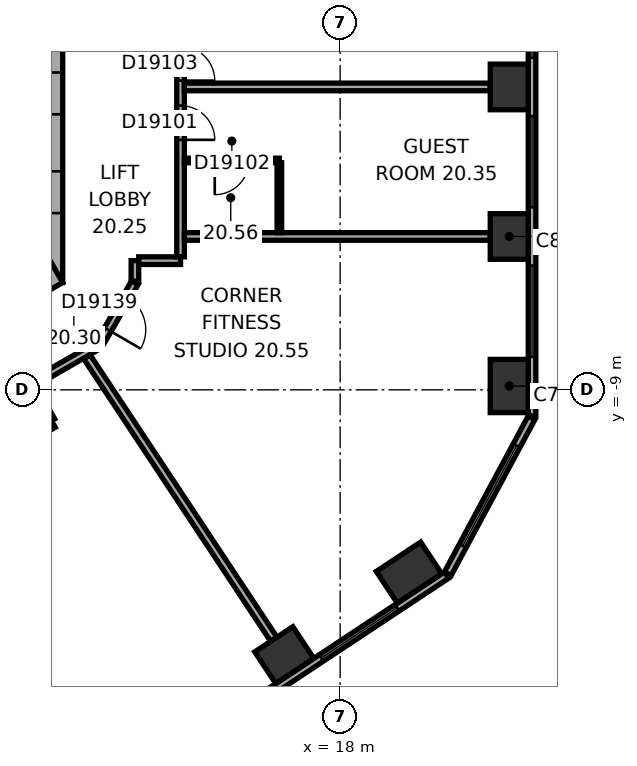
"""IFC4 building model, lengths in metres.
Left out: names, types, materials, properties, quantities, classifications, styles, units other than length and angle.
Written with IfcOpenShell. Run it as: python <this file> out.ifc"""

import sys

from ifc_helpers import new_model, si_unit, direction, frame, frame_2d, origin, origin_2d, place, context, subcontext, project, spatial, rectangle, extrude, element, fill, save


model = new_model("IFC4")
c1 = context("Model", 3, precision=1e-05, world=origin(), true_north=direction((0.0, 1.0)))
c2 = subcontext(c1, "Body", "Model", "MODEL_VIEW")
j1 = project(units=[si_unit("LENGTHUNIT", "METRE"), si_unit("PLANEANGLEUNIT", "RADIAN")], contexts=[c1])
p1 = place(None, origin())
s1 = spatial("IfcSite", under=j1, at=p1, CompositionType="ELEMENT")
p2 = place(p1, origin())
s2 = spatial("IfcBuilding", under=s1, at=p2, CompositionType="ELEMENT")
p3 = place(p2, frame((0.0, 0.0, 90.2)))
s3 = spatial("IfcBuildingStorey", under=s2, at=p3, CompositionType="ELEMENT", Elevation=90.2)
p4 = place(p3, frame((22.45, -8.899, 0.0), z_axis=(0.0, 0.0, 1.0), x_axis=(0.0, 1.0, 0.0)))
e1 = element("IfcColumn", 1, at=p4, inside=s3, PredefinedType="COLUMN", context=c2, shape_type="SweptSolid", body=[
    extrude(rectangle(XDim=1.4, YDim=1.0, at=origin_2d()), origin(), (0.0, 0.0, 1.0), 3.3),
])
for number, where, z_axis, x_axis in (
    (2, (22.45, -4.965, 0.0), (0.0, 0.0, 1.0), (0.0, 1.0, 0.0)),
    (3, (22.45, -1.03, 0.0), (0.0, 0.0, 1.0), (0.0, 1.0, 0.0)),
    (4, (16.531, -15.981, 0.0), (0.0, 0.0, 1.0), (0.834, 0.552, 0.0)),
):
    element("IfcColumn", number, at=place(p3, frame(where, z_axis=z_axis, x_axis=x_axis)), inside=s3, PredefinedType="COLUMN", context=c2, shape_type="SweptSolid", body=[
        extrude(rectangle(XDim=1.2, YDim=1.0, at=origin_2d()), origin(), (0.0, 0.0, 1.0), 3.3),
    ])
p5 = place(p3, frame((19.812, -13.809, 0.0), z_axis=(0.0, 0.0, 1.0), x_axis=(0.833885822067, 0.551936985312, 0.0)))
e5 = element("IfcColumn", 5, at=p5, inside=s3, PredefinedType="COLUMN", context=c2, shape_type="SweptSolid", body=[
    extrude(rectangle(XDim=1.4, YDim=1.0, at=origin_2d()), origin(), (0.0, 0.0, 1.0), 3.3),
])
p6 = place(p3, frame((10.1, -6.177, 0.0), z_axis=(0.0, 0.0, 1.0), x_axis=(0.0, 1.0, 0.0)))
e6 = element("IfcWall", 6, at=p6, inside=s3, PredefinedType="SHEAR", context=c2, shape_type="SweptSolid", body=[
    extrude(rectangle(XDim=12.355, YDim=1.2, at=frame_2d((6.177, 0.0))), origin(), (0.0, 0.0, 1.0), 3.3),
])
p7 = place(p6, frame((6.378, 0.0, 0.0)))
e7 = element("IfcOpeningElement", 7, at=p7, cuts=e6, PredefinedType="OPENING", context=c2, shape_type="SweptSolid", body=[
    extrude(rectangle(XDim=1.5, YDim=2.1, at=frame_2d((0.75, 1.05))), frame((0.0, 0.61, 0.0), z_axis=(0.0, -1.0, 0.0), x_axis=(1.0, 0.0, 0.0)), (0.0, 0.0, 1.0), 1.22),
])
p8 = place(p6, frame((1.828, 0.0, 0.0)))
e8 = element("IfcOpeningElement", 8, at=p8, cuts=e6, PredefinedType="OPENING", context=c2, shape_type="SweptSolid", body=[
    extrude(rectangle(XDim=1.1, YDim=2.1, at=frame_2d((0.55, 1.05))), frame((0.0, 0.61, 0.0), z_axis=(0.0, -1.0, 0.0), x_axis=(1.0, 0.0, 0.0)), (0.0, 0.0, 1.0), 1.22),
])
p9 = place(p6, frame((4.427, 0.0, 0.0)))
e9 = element("IfcOpeningElement", 9, at=p9, cuts=e6, PredefinedType="OPENING", context=c2, shape_type="SweptSolid", body=[
    extrude(rectangle(XDim=1.1, YDim=2.1, at=frame_2d((0.55, 1.05))), frame((0.0, 0.61, 0.0), z_axis=(0.0, -1.0, 0.0), x_axis=(1.0, 0.0, 0.0)), (0.0, 0.0, 1.0), 1.22),
])
p10 = place(p3, frame((-0.3, -11.836, 0.0), z_axis=(0.0, 0.0, 1.0), x_axis=(0.866021384402, 0.500006961711, 0.0)))
e10 = element("IfcWall", 10, at=p10, inside=s3, PredefinedType="SHEAR", context=c2, shape_type="SweptSolid", body=[
    extrude(rectangle(XDim=12.355, YDim=1.2, at=frame_2d((6.178, 0.0))), origin(), (0.0, 0.0, 1.0), 3.3),
])
p11 = place(p10, frame((4.128, 0.0, 0.0)))
e11 = element("IfcOpeningElement", 11, at=p11, cuts=e10, PredefinedType="OPENING", context=c2, shape_type="SweptSolid", body=[
    extrude(rectangle(XDim=0.9, YDim=2.1, at=frame_2d((0.45, 1.05))), frame((0.0, 0.61, 0.0), z_axis=(0.0, -1.0, 0.0), x_axis=(1.0, 0.0, 0.0)), (0.0, 0.0, 1.0), 1.22),
])
p12 = place(p10, frame((7.928, 0.0, 0.0)))
e12 = element("IfcOpeningElement", 12, at=p12, cuts=e10, PredefinedType="OPENING", context=c2, shape_type="SweptSolid", body=[
    extrude(rectangle(XDim=1.1, YDim=2.1, at=frame_2d((0.55, 1.05))), frame((0.0, 0.61, 0.0), z_axis=(0.0, -1.0, 0.0), x_axis=(1.0, 0.0, 0.0)), (0.0, 0.0, 1.0), 1.22),
])
p13 = place(p3, frame((23.05, -9.687, 0.0), z_axis=(0.0, 0.0, 1.0), x_axis=(0.0, 1.0, 0.0)))
e13 = element("IfcWall", 13, at=p13, inside=s3, PredefinedType="STANDARD", context=c2, shape_type="SweptSolid", body=[
    extrude(rectangle(XDim=21.246, YDim=0.2, at=frame_2d((10.623, 0.0))), origin(), (0.0, 0.0, 1.0), 3.3),
])
p14 = place(p13, frame((1.555, 0.0, 0.8)))
e14 = element("IfcOpeningElement", 14, at=p14, cuts=e13, PredefinedType="OPENING", context=c2, shape_type="SweptSolid", body=[
    extrude(rectangle(XDim=2.4, YDim=1.7, at=frame_2d((1.2, 0.85))), frame((0.0, 0.11, 0.0), z_axis=(0.0, -1.0, 0.0), x_axis=(1.0, 0.0, 0.0)), (0.0, 0.0, 1.0), 0.22),
])
p15 = place(p13, frame((5.489, 0.0, 0.8)))
e15 = element("IfcOpeningElement", 15, at=p15, cuts=e13, PredefinedType="OPENING", context=c2, shape_type="SweptSolid", body=[
    extrude(rectangle(XDim=2.4, YDim=1.7, at=frame_2d((1.2, 0.85))), frame((0.0, 0.11, 0.0), z_axis=(0.0, -1.0, 0.0), x_axis=(1.0, 0.0, 0.0)), (0.0, 0.0, 1.0), 0.22),
])
p16 = place(p13, frame((9.424, 0.0, 0.8)))
e16 = element("IfcOpeningElement", 16, at=p16, cuts=e13, PredefinedType="OPENING", context=c2, shape_type="SweptSolid", body=[
    extrude(rectangle(XDim=2.4, YDim=1.7, at=frame_2d((1.2, 0.85))), frame((0.0, 0.11, 0.0), z_axis=(0.0, -1.0, 0.0), x_axis=(1.0, 0.0, 0.0)), (0.0, 0.0, 1.0), 0.22),
])
p17 = place(p13, frame((13.358, 0.0, 0.8)))
e17 = element("IfcOpeningElement", 17, at=p17, cuts=e13, PredefinedType="OPENING", context=c2, shape_type="SweptSolid", body=[
    extrude(rectangle(XDim=2.4, YDim=1.7, at=frame_2d((1.2, 0.85))), frame((0.0, 0.11, 0.0), z_axis=(0.0, -1.0, 0.0), x_axis=(1.0, 0.0, 0.0)), (0.0, 0.0, 1.0), 0.22),
])
p18 = place(p13, frame((17.293, 0.0, 0.8)))
e18 = element("IfcOpeningElement", 18, at=p18, cuts=e13, PredefinedType="OPENING", context=c2, shape_type="SweptSolid", body=[
    extrude(rectangle(XDim=2.4, YDim=1.7, at=frame_2d((1.2, 0.85))), frame((0.0, 0.11, 0.0), z_axis=(0.0, -1.0, 0.0), x_axis=(1.0, 0.0, 0.0)), (0.0, 0.0, 1.0), 0.22),
])
p19 = place(p3, frame((3.083, -25.601, 0.0), z_axis=(0.0, 0.0, 1.0), x_axis=(0.833884295743, 0.551939291329, 0.0)))
e19 = element("IfcWall", 19, at=p19, inside=s3, PredefinedType="STANDARD", context=c2, shape_type="SweptSolid", body=[
    extrude(rectangle(XDim=21.246, YDim=0.2, at=frame_2d((10.623, 0.0))), origin(), (0.0, 0.0, 1.0), 3.3),
])
p20 = place(p19, frame((1.553, 0.0, 0.8)))
e20 = element("IfcOpeningElement", 20, at=p20, cuts=e19, PredefinedType="OPENING", context=c2, shape_type="SweptSolid", body=[
    extrude(rectangle(XDim=2.4, YDim=1.7, at=frame_2d((1.2, 0.85))), frame((0.0, 0.11, 0.0), z_axis=(0.0, -1.0, 0.0), x_axis=(1.0, 0.0, 0.0)), (0.0, 0.0, 1.0), 0.22),
])
p21 = place(p19, frame((5.488, 0.0, 0.8)))
e21 = element("IfcOpeningElement", 21, at=p21, cuts=e19, PredefinedType="OPENING", context=c2, shape_type="SweptSolid", body=[
    extrude(rectangle(XDim=2.4, YDim=1.7, at=frame_2d((1.2, 0.85))), frame((0.0, 0.11, 0.0), z_axis=(0.0, -1.0, 0.0), x_axis=(1.0, 0.0, 0.0)), (0.0, 0.0, 1.0), 0.22),
])
p22 = place(p19, frame((9.422, 0.0, 0.8)))
e22 = element("IfcOpeningElement", 22, at=p22, cuts=e19, PredefinedType="OPENING", context=c2, shape_type="SweptSolid", body=[
    extrude(rectangle(XDim=2.4, YDim=1.7, at=frame_2d((1.2, 0.85))), frame((0.0, 0.11, 0.0), z_axis=(0.0, -1.0, 0.0), x_axis=(1.0, 0.0, 0.0)), (0.0, 0.0, 1.0), 0.22),
])
p23 = place(p19, frame((13.357, 0.0, 0.8)))
e23 = element("IfcOpeningElement", 23, at=p23, cuts=e19, PredefinedType="OPENING", context=c2, shape_type="SweptSolid", body=[
    extrude(rectangle(XDim=2.4, YDim=1.7, at=frame_2d((1.2, 0.85))), frame((0.0, 0.11, 0.0), z_axis=(0.0, -1.0, 0.0), x_axis=(1.0, 0.0, 0.0)), (0.0, 0.0, 1.0), 0.22),
])
p24 = place(p19, frame((17.291, 0.0, 0.8)))
e24 = element("IfcOpeningElement", 24, at=p24, cuts=e19, PredefinedType="OPENING", context=c2, shape_type="SweptSolid", body=[
    extrude(rectangle(XDim=2.4, YDim=1.7, at=frame_2d((1.2, 0.85))), frame((0.0, 0.11, 0.0), z_axis=(0.0, -1.0, 0.0), x_axis=(1.0, 0.0, 0.0)), (0.0, 0.0, 1.0), 0.22),
])
p25 = place(p3, frame((20.833, -13.839, 0.0), z_axis=(0.0, 0.0, 1.0), x_axis=(0.473321668581, 0.880889662813, 0.0)))
e25 = element("IfcWall", 25, at=p25, inside=s3, PredefinedType="STANDARD", context=c2, shape_type="SweptSolid", body=[
    extrude(rectangle(XDim=4.66, YDim=0.2, at=frame_2d((2.33, 0.0))), origin(), (0.0, 0.0, 1.0), 3.3),
])
p26 = place(p25, frame((0.83, 0.0, 0.8)))
e26 = element("IfcOpeningElement", 26, at=p26, cuts=e25, PredefinedType="OPENING", context=c2, shape_type="SweptSolid", body=[
    extrude(rectangle(XDim=3.0, YDim=1.7, at=frame_2d((1.5, 0.85))), frame((0.0, 0.11, 0.0), z_axis=(0.0, -1.0, 0.0), x_axis=(1.0, 0.0, 0.0)), (0.0, 0.0, 1.0), 0.22),
])
p27 = place(p3, frame((7.419, -11.653, 0.0), z_axis=(0.0, 0.0, 1.0), x_axis=(0.866038154057, 0.49997791523, 0.0)))
e27 = element("IfcWall", 27, at=p27, inside=s3, PredefinedType="PARTITIONING", context=c2, shape_type="SweptSolid", body=[
    extrude(rectangle(XDim=3.502, YDim=0.2, at=frame_2d((1.751, 0.0))), origin(), (0.0, 0.0, 1.0), 3.05),
])
p28 = place(p3, frame((9.852, -8.861, 0.0), z_axis=(0.0, 0.0, 1.0), x_axis=(0.866013291437, 0.500020978615, 0.0)))
e28 = element("IfcWall", 28, at=p28, inside=s3, PredefinedType="PARTITIONING", context=c2, shape_type="SweptSolid", body=[
    extrude(rectangle(XDim=2.077, YDim=0.2, at=frame_2d((1.038, 0.0))), origin(), (0.0, 0.0, 1.0), 3.05),
])
p29 = place(p3, frame((10.402, -9.815, 0.0), z_axis=(0.0, 0.0, 1.0), x_axis=(-0.499968756647, 0.866043441391, 0.0)))
e29 = element("IfcWall", 29, at=p29, inside=s3, PredefinedType="PARTITIONING", context=c2, shape_type="SweptSolid", body=[
    extrude(rectangle(XDim=1.001, YDim=0.2, at=frame_2d((0.5, 0.0))), origin(), (0.0, 0.0, 1.0), 3.05),
])
p30 = place(p3, frame((11.67, -7.788, 0.0), z_axis=(0.0, 0.0, 1.0), x_axis=(0.500063286585, 0.865988862174, 0.0)))
e30 = element("IfcWall", 30, at=p30, inside=s3, PredefinedType="PARTITIONING", context=c2, shape_type="SweptSolid", body=[
    extrude(rectangle(XDim=1.86, YDim=0.2, at=frame_2d((0.93, 0.0))), origin(), (0.0, 0.0, 1.0), 3.05),
])
p31 = place(p30, frame((0.43, 0.0, 0.0)))
e31 = element("IfcOpeningElement", 31, at=p31, cuts=e30, PredefinedType="OPENING", context=c2, shape_type="SweptSolid", body=[
    extrude(rectangle(XDim=1.0, YDim=2.1, at=frame_2d((0.5, 1.05))), frame((0.0, 0.11, 0.0), z_axis=(0.0, -1.0, 0.0), x_axis=(1.0, 0.0, 0.0)), (0.0, 0.0, 1.0), 0.22),
])
p32 = place(p3, frame((12.6, -6.138, 0.0), z_axis=(0.0, 0.0, 1.0), x_axis=(0.0, 1.0, 0.0)))
e32 = element("IfcWall", 32, at=p32, inside=s3, PredefinedType="PARTITIONING", context=c2, shape_type="SweptSolid", body=[
    extrude(rectangle(XDim=0.537, YDim=0.2, at=frame_2d((0.268, 0.0))), origin(), (0.0, 0.0, 1.0), 3.05),
])
p33 = place(p3, frame((12.7, -5.601, 0.0), z_axis=(0.0, 0.0, 1.0), x_axis=(1.0, 0.0, 0.0)))
e33 = element("IfcWall", 33, at=p33, inside=s3, PredefinedType="PARTITIONING", context=c2, shape_type="SweptSolid", body=[
    extrude(rectangle(XDim=1.101, YDim=0.2, at=frame_2d((0.551, 0.0))), origin(), (0.0, 0.0, 1.0), 3.05),
])
p34 = place(p3, frame((13.801, -5.501, 0.0), z_axis=(0.0, 0.0, 1.0), x_axis=(0.0, 1.0, 0.0)))
e34 = element("IfcWall", 34, at=p34, inside=s3, PredefinedType="PARTITIONING", context=c2, shape_type="SweptSolid", body=[
    extrude(rectangle(XDim=5.702, YDim=0.2, at=frame_2d((2.851, 0.0))), origin(), (0.0, 0.0, 1.0), 3.05),
])
p35 = place(p34, frame((3.079, 0.0, 0.0)))
e35 = element("IfcOpeningElement", 35, at=p35, cuts=e34, PredefinedType="OPENING", context=c2, shape_type="SweptSolid", body=[
    extrude(rectangle(XDim=0.9, YDim=2.1, at=frame_2d((0.45, 1.05))), frame((0.0, 0.11, 0.0), z_axis=(0.0, -1.0, 0.0), x_axis=(1.0, 0.0, 0.0)), (0.0, 0.0, 1.0), 0.22),
])
p36 = place(p34, frame((4.636, 0.0, 0.0)))
e36 = element("IfcOpeningElement", 36, at=p36, cuts=e34, PredefinedType="OPENING", context=c2, shape_type="SweptSolid", body=[
    extrude(rectangle(XDim=0.9, YDim=2.1, at=frame_2d((0.45, 1.05))), frame((0.0, 0.11, 0.0), z_axis=(0.0, -1.0, 0.0), x_axis=(1.0, 0.0, 0.0)), (0.0, 0.0, 1.0), 0.22),
])
p37 = place(p3, frame((13.901, -4.965, 0.0), z_axis=(0.0, 0.0, 1.0), x_axis=(1.0, 0.0, 0.0)))
e37 = element("IfcWall", 37, at=p37, inside=s3, PredefinedType="PARTITIONING", context=c2, shape_type="SweptSolid", body=[
    extrude(rectangle(XDim=8.049, YDim=0.2, at=frame_2d((4.024, 0.0))), origin(), (0.0, 0.0, 1.0), 3.05),
])
p38 = place(p3, frame((13.901, -2.965, 0.0), z_axis=(0.0, 0.0, 1.0), x_axis=(1.0, 0.0, 0.0)))
e38 = element("IfcWall", 38, at=p38, inside=s3, PredefinedType="PARTITIONING", context=c2, shape_type="SweptSolid", body=[
    extrude(rectangle(XDim=2.5, YDim=0.12, at=frame_2d((1.25, 0.0))), origin(), (0.0, 0.0, 1.0), 3.05),
])
p39 = place(p38, frame((0.8, 0.0, 0.0)))
e39 = element("IfcOpeningElement", 39, at=p39, cuts=e38, PredefinedType="OPENING", context=c2, shape_type="SweptSolid", body=[
    extrude(rectangle(XDim=0.9, YDim=2.1, at=frame_2d((0.45, 1.05))), frame((0.0, 0.07, 0.0), z_axis=(0.0, -1.0, 0.0), x_axis=(1.0, 0.0, 0.0)), (0.0, 0.0, 1.0), 0.14),
])
p40 = place(p3, frame((16.255, -15.564, 0.0), z_axis=(0.0, 0.0, 1.0), x_axis=(-0.55192208744, 0.833895682562, 0.0)))
e40 = element("IfcWall", 40, at=p40, inside=s3, PredefinedType="PARTITIONING", context=c2, shape_type="SweptSolid", body=[
    extrude(rectangle(XDim=8.913, YDim=0.2, at=frame_2d((4.457, 0.0))), origin(), (0.0, 0.0, 1.0), 2.6),
])
p41 = place(p3, frame((16.401, -3.025, 0.0), z_axis=(0.0, 0.0, 1.0), x_axis=(0.0, -1.0, 0.0)))
e41 = element("IfcWall", 41, at=p41, inside=s3, PredefinedType="PARTITIONING", context=c2, shape_type="SweptSolid", body=[
    extrude(rectangle(XDim=1.84, YDim=0.12, at=frame_2d((0.92, 0.0))), origin(), (0.0, 0.0, 1.0), 3.05),
])
p42 = place(p3, frame((21.95, -1.03, 0.0), z_axis=(0.0, 0.0, 1.0), x_axis=(-1.0, 0.0, 0.0)))
e42 = element("IfcWall", 42, at=p42, inside=s3, PredefinedType="PARTITIONING", context=c2, shape_type="SweptSolid", body=[
    extrude(rectangle(XDim=8.049, YDim=0.2, at=frame_2d((4.024, 0.0))), origin(), (0.0, 0.0, 1.0), 2.6),
])
p43 = place(p14, origin())
e43 = element("IfcWindow", 43, at=p43, inside=s3, PartitioningType="SINGLE_PANEL", PredefinedType="WINDOW", context=c2, shape_type="SweptSolid", body=[
    extrude(rectangle(XDim=2.4, YDim=1.7, at=frame_2d((1.2, 0.85))), frame((0.0, 0.03, 0.0), z_axis=(0.0, -1.0, 0.0), x_axis=(1.0, 0.0, 0.0)), (0.0, 0.0, 1.0), 0.06),
])
fill(e14, e43)
p44 = place(p15, origin())
e44 = element("IfcWindow", 44, at=p44, inside=s3, PartitioningType="SINGLE_PANEL", PredefinedType="WINDOW", context=c2, shape_type="SweptSolid", body=[
    extrude(rectangle(XDim=2.4, YDim=1.7, at=frame_2d((1.2, 0.85))), frame((0.0, 0.03, 0.0), z_axis=(0.0, -1.0, 0.0), x_axis=(1.0, 0.0, 0.0)), (0.0, 0.0, 1.0), 0.06),
])
fill(e15, e44)
p45 = place(p16, origin())
e45 = element("IfcWindow", 45, at=p45, inside=s3, PartitioningType="SINGLE_PANEL", PredefinedType="WINDOW", context=c2, shape_type="SweptSolid", body=[
    extrude(rectangle(XDim=2.4, YDim=1.7, at=frame_2d((1.2, 0.85))), frame((0.0, 0.03, 0.0), z_axis=(0.0, -1.0, 0.0), x_axis=(1.0, 0.0, 0.0)), (0.0, 0.0, 1.0), 0.06),
])
fill(e16, e45)
p46 = place(p24, origin())
e46 = element("IfcWindow", 46, at=p46, inside=s3, PartitioningType="SINGLE_PANEL", PredefinedType="WINDOW", context=c2, shape_type="SweptSolid", body=[
    extrude(rectangle(XDim=2.4, YDim=1.7, at=frame_2d((1.2, 0.85))), frame((0.0, 0.03, 0.0), z_axis=(0.0, -1.0, 0.0), x_axis=(1.0, 0.0, 0.0)), (0.0, 0.0, 1.0), 0.06),
])
fill(e24, e46)
p47 = place(p26, origin())
e47 = element("IfcWindow", 47, at=p47, inside=s3, PartitioningType="SINGLE_PANEL", PredefinedType="WINDOW", context=c2, shape_type="SweptSolid", body=[
    extrude(rectangle(XDim=3.0, YDim=1.7, at=frame_2d((1.5, 0.85))), frame((0.0, 0.03, 0.0), z_axis=(0.0, -1.0, 0.0), x_axis=(1.0, 0.0, 0.0)), (0.0, 0.0, 1.0), 0.06),
])
fill(e26, e47)
p48 = place(p35, origin())
e48 = element("IfcDoor", 48, at=p48, inside=s3, OperationType="SINGLE_SWING_LEFT", PredefinedType="DOOR", context=c2, shape_type="SweptSolid", body=[
    extrude(rectangle(XDim=0.9, YDim=2.1, at=frame_2d((0.45, 1.05))), frame((0.0, 0.025, 0.0), z_axis=(0.0, -1.0, 0.0), x_axis=(1.0, 0.0, 0.0)), (0.0, 0.0, 1.0), 0.05),
])
fill(e35, e48)
p49 = place(p39, origin())
e49 = element("IfcDoor", 49, at=p49, inside=s3, OperationType="SINGLE_SWING_LEFT", PredefinedType="DOOR", context=c2, shape_type="SweptSolid", body=[
    extrude(rectangle(XDim=0.9, YDim=2.1, at=frame_2d((0.45, 1.05))), frame((0.0, 0.025, 0.0), z_axis=(0.0, -1.0, 0.0), x_axis=(1.0, 0.0, 0.0)), (0.0, 0.0, 1.0), 0.05),
])
fill(e39, e49)
p50 = place(p36, origin())
e50 = element("IfcDoor", 50, at=p50, inside=s3, OperationType="SINGLE_SWING_LEFT", PredefinedType="DOOR", context=c2, shape_type="SweptSolid", body=[
    extrude(rectangle(XDim=0.9, YDim=2.1, at=frame_2d((0.45, 1.05))), frame((0.0, 0.025, 0.0), z_axis=(0.0, -1.0, 0.0), x_axis=(1.0, 0.0, 0.0)), (0.0, 0.0, 1.0), 0.05),
])
fill(e36, e50)
p51 = place(p31, origin())
e51 = element("IfcDoor", 51, at=p51, inside=s3, OperationType="SINGLE_SWING_LEFT", PredefinedType="DOOR", context=c2, shape_type="SweptSolid", body=[
    extrude(rectangle(XDim=1.0, YDim=2.1, at=frame_2d((0.5, 1.05))), frame((0.0, 0.025, 0.0), z_axis=(0.0, -1.0, 0.0), x_axis=(1.0, 0.0, 0.0)), (0.0, 0.0, 1.0), 0.05),
])
fill(e31, e51)
save(model, sys.argv[1])
